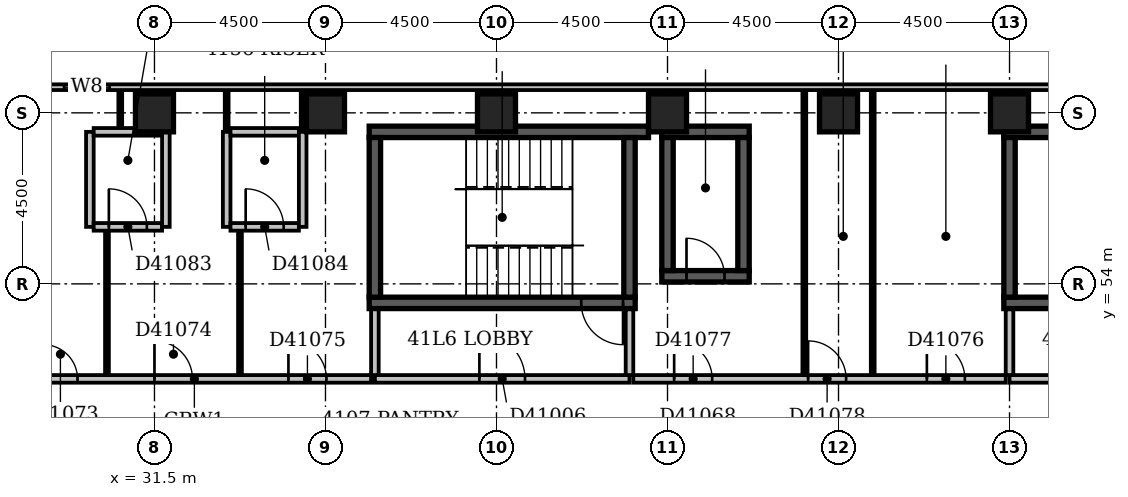
"""IFC4 building model, lengths in metres.
Left out: names, types, materials, properties, quantities, classifications, styles, units other than length and angle.
Written with IfcOpenShell. Run it as: python <this file> out.ifc"""

import sys

from ifc_helpers import new_model, si_unit, direction, frame, frame_2d, origin, origin_2d, place, context, subcontext, project, spatial, rectangle, extrude, element, fill, save


model = new_model("IFC4")
c1 = context("Model", 3, precision=1e-05, world=origin(), true_north=direction((0.0, 1.0)))
c2 = subcontext(c1, "Body", "Model", "MODEL_VIEW")
j1 = project(units=[si_unit("LENGTHUNIT", "METRE"), si_unit("PLANEANGLEUNIT", "RADIAN")], contexts=[c1])
p1 = place(None, origin())
s1 = spatial("IfcSite", under=j1, at=p1, CompositionType="ELEMENT")
p2 = place(p1, origin())
s2 = spatial("IfcBuilding", under=s1, at=p2, CompositionType="ELEMENT")
p3 = place(p2, frame((0.0, 0.0, 162.8)))
s3 = spatial("IfcBuildingStorey", under=s2, at=p3, CompositionType="ELEMENT", Elevation=162.8)
p4 = place(p3, frame((37.15, 53.5, -0.3), z_axis=(0.0, 0.0, 1.0), x_axis=(1.0, 0.0, 0.0)))
e1 = element("IfcWall", 1, at=p4, inside=s3, PredefinedType="SHEAR", context=c2, shape_type="SweptSolid", body=[
    extrude(rectangle(XDim=7.0, YDim=0.3, at=frame_2d((3.5, 0.0))), origin(), (0.0, 0.0, 1.0), 3.6),
])
p5 = place(p4, frame((5.58, 0.0, 0.3)))
e2 = element("IfcOpeningElement", 2, at=p5, cuts=e1, PredefinedType="OPENING", context=c2, shape_type="SweptSolid", body=[
    extrude(rectangle(XDim=1.1, YDim=2.1, at=frame_2d((0.55, 1.05))), frame((0.0, 0.162, 0.0), z_axis=(0.0, -1.0, 0.0), x_axis=(1.0, 0.0, 0.0)), (0.0, 0.0, 1.0), 0.324),
])
p6 = place(p3, frame((37.15, 58.0, -0.3), z_axis=(0.0, 0.0, 1.0), x_axis=(1.0, 0.0, 0.0)))
e3 = element("IfcWall", 3, at=p6, inside=s3, PredefinedType="SHEAR", context=c2, shape_type="SweptSolid", body=[
    extrude(rectangle(XDim=7.35, YDim=0.3, at=frame_2d((3.675, 0.0))), origin(), (0.0, 0.0, 1.0), 3.6),
])
for number, where, z_axis, x_axis in (
    (4, (37.3, 53.65, -0.3), (0.0, 0.0, 1.0), (0.0, 1.0, 0.0)),
    (5, (44.0, 53.65, -0.3), (0.0, 0.0, 1.0), (0.0, 1.0, 0.0)),
):
    element("IfcWall", number, at=place(p3, frame(where, z_axis=z_axis, x_axis=x_axis)), inside=s3, PredefinedType="SHEAR", context=c2, shape_type="SweptSolid", body=[
        extrude(rectangle(XDim=4.2, YDim=0.3, at=frame_2d((2.1, 0.0))), origin(), (0.0, 0.0, 1.0), 3.6),
    ])
p7 = place(p3, frame((44.85, 54.2, -0.3), z_axis=(0.0, 0.0, 1.0), x_axis=(1.0, 0.0, 0.0)))
e6 = element("IfcWall", 6, at=p7, inside=s3, PredefinedType="SHEAR", context=c2, shape_type="SweptSolid", body=[
    extrude(rectangle(XDim=2.3, YDim=0.3, at=frame_2d((1.15, 0.0))), origin(), (0.0, 0.0, 1.0), 3.6),
])
p8 = place(p7, frame((0.65, 0.0, 0.3)))
e7 = element("IfcOpeningElement", 7, at=p8, cuts=e6, PredefinedType="OPENING", context=c2, shape_type="SweptSolid", body=[
    extrude(rectangle(XDim=1.0, YDim=2.1, at=frame_2d((0.5, 1.05))), frame((0.0, 0.162, 0.0), z_axis=(0.0, -1.0, 0.0), x_axis=(1.0, 0.0, 0.0)), (0.0, 0.0, 1.0), 0.324),
])
p9 = place(p3, frame((44.85, 58.0, -0.3), z_axis=(0.0, 0.0, 1.0), x_axis=(1.0, 0.0, 0.0)))
e8 = element("IfcWall", 8, at=p9, inside=s3, PredefinedType="SHEAR", context=c2, shape_type="SweptSolid", body=[
    extrude(rectangle(XDim=2.3, YDim=0.3, at=frame_2d((1.15, 0.0))), origin(), (0.0, 0.0, 1.0), 3.6),
])
for number, where, z_axis, x_axis in (
    (9, (45.0, 54.35, -0.3), (0.0, 0.0, 1.0), (0.0, 1.0, 0.0)),
    (10, (47.0, 54.35, -0.3), (0.0, 0.0, 1.0), (0.0, 1.0, 0.0)),
):
    element("IfcWall", number, at=place(p3, frame(where, z_axis=z_axis, x_axis=x_axis)), inside=s3, PredefinedType="SHEAR", context=c2, shape_type="SweptSolid", body=[
        extrude(rectangle(XDim=3.5, YDim=0.3, at=frame_2d((1.75, 0.0))), origin(), (0.0, 0.0, 1.0), 3.6),
    ])
p10 = place(p3, frame((53.85, 53.5, -0.3), z_axis=(0.0, 0.0, 1.0), x_axis=(1.0, 0.0, 0.0)))
e11 = element("IfcWall", 11, at=p10, inside=s3, PredefinedType="SHEAR", context=c2, shape_type="SweptSolid", body=[
    extrude(rectangle(XDim=7.0, YDim=0.3, at=frame_2d((3.5, 0.0))), origin(), (0.0, 0.0, 1.0), 3.6),
])
p11 = place(p10, frame((5.58, 0.0, 0.3)))
e12 = element("IfcOpeningElement", 12, at=p11, cuts=e11, PredefinedType="OPENING", context=c2, shape_type="SweptSolid", body=[
    extrude(rectangle(XDim=1.1, YDim=2.1, at=frame_2d((0.55, 1.05))), frame((0.0, 0.162, 0.0), z_axis=(0.0, -1.0, 0.0), x_axis=(1.0, 0.0, 0.0)), (0.0, 0.0, 1.0), 0.324),
])
p12 = place(p3, frame((53.85, 58.0, -0.3), z_axis=(0.0, 0.0, 1.0), x_axis=(1.0, 0.0, 0.0)))
e13 = element("IfcWall", 13, at=p12, inside=s3, PredefinedType="SHEAR", context=c2, shape_type="SweptSolid", body=[
    extrude(rectangle(XDim=7.0, YDim=0.3, at=frame_2d((3.5, 0.0))), origin(), (0.0, 0.0, 1.0), 3.6),
])
p13 = place(p3, frame((54.0, 53.65, -0.3), z_axis=(0.0, 0.0, 1.0), x_axis=(0.0, 1.0, 0.0)))
e14 = element("IfcWall", 14, at=p13, inside=s3, PredefinedType="SHEAR", context=c2, shape_type="SweptSolid", body=[
    extrude(rectangle(XDim=4.2, YDim=0.3, at=frame_2d((2.1, 0.0))), origin(), (0.0, 0.0, 1.0), 3.6),
])
for number, where, z_axis, x_axis in (
    (15, (31.5, 58.5, -0.3), (0.0, 0.0, 1.0), (1.0, 0.0, 0.0)),
    (16, (36.0, 58.5, -0.3), (0.0, 0.0, 1.0), (1.0, 0.0, 0.0)),
    (17, (40.5, 58.5, -0.3), (0.0, 0.0, 1.0), (1.0, 0.0, 0.0)),
    (18, (45.0, 58.5, -0.3), (0.0, 0.0, 1.0), (1.0, 0.0, 0.0)),
    (19, (49.5, 58.5, -0.3), (0.0, 0.0, 1.0), (1.0, 0.0, 0.0)),
    (20, (54.0, 58.5, -0.3), (0.0, 0.0, 1.0), (1.0, 0.0, 0.0)),
):
    element("IfcColumn", number, at=place(p3, frame(where, z_axis=z_axis, x_axis=x_axis)), inside=s3, PredefinedType="COLUMN", context=c2, shape_type="SweptSolid", body=[
        extrude(rectangle(XDim=1.0, YDim=1.0, at=origin_2d()), origin(), (0.0, 0.0, 1.0), 3.6),
    ])
p14 = place(p3, frame((68.1, 59.175, 0.0), z_axis=(0.0, 0.0, 1.0), x_axis=(-1.0, 0.0, 0.0)))
e21 = element("IfcWall", 21, at=p14, inside=s3, PredefinedType="STANDARD", context=c2, shape_type="SweptSolid", body=[
    extrude(rectangle(XDim=68.85, YDim=0.15, at=frame_2d((34.425, 0.0))), origin(), (0.0, 0.0, 1.0), 2.7),
])
p15 = place(p14, frame((1.65, 0.0, 0.6)))
e22 = element("IfcOpeningElement", 22, at=p15, cuts=e21, PredefinedType="OPENING", context=c2, shape_type="SweptSolid", body=[
    extrude(rectangle(XDim=2.4, YDim=1.8, at=frame_2d((1.2, 0.9))), frame((0.0, 0.087, 0.0), z_axis=(0.0, -1.0, 0.0), x_axis=(1.0, 0.0, 0.0)), (0.0, 0.0, 1.0), 0.174),
])
p16 = place(p14, frame((6.15, 0.0, 0.6)))
e23 = element("IfcOpeningElement", 23, at=p16, cuts=e21, PredefinedType="OPENING", context=c2, shape_type="SweptSolid", body=[
    extrude(rectangle(XDim=2.4, YDim=1.8, at=frame_2d((1.2, 0.9))), frame((0.0, 0.087, 0.0), z_axis=(0.0, -1.0, 0.0), x_axis=(1.0, 0.0, 0.0)), (0.0, 0.0, 1.0), 0.174),
])
p17 = place(p14, frame((37.78, 0.0, 0.6)))
e24 = element("IfcOpeningElement", 24, at=p17, cuts=e21, PredefinedType="OPENING", context=c2, shape_type="SweptSolid", body=[
    extrude(rectangle(XDim=1.2, YDim=1.8, at=frame_2d((0.6, 0.9))), frame((0.0, 0.087, 0.0), z_axis=(0.0, -1.0, 0.0), x_axis=(1.0, 0.0, 0.0)), (0.0, 0.0, 1.0), 0.174),
])
p18 = place(p3, frame((37.3, 51.5, 0.0), z_axis=(0.0, 0.0, 1.0), x_axis=(1.0, 0.0, 0.0)))
e25 = element("IfcWall", 25, at=p18, inside=s3, PredefinedType="PARTITIONING", context=c2, shape_type="SweptSolid", body=[
    extrude(rectangle(XDim=6.7, YDim=0.2, at=frame_2d((3.35, 0.0))), origin(), (0.0, 0.0, 1.0), 3.3),
])
p19 = place(p18, frame((2.75, 0.0, 0.0)))
e26 = element("IfcOpeningElement", 26, at=p19, cuts=e25, PredefinedType="OPENING", context=c2, shape_type="SweptSolid", body=[
    extrude(rectangle(XDim=1.2, YDim=2.1, at=frame_2d((0.6, 1.05))), frame((0.0, 0.112, 0.0), z_axis=(0.0, -1.0, 0.0), x_axis=(1.0, 0.0, 0.0)), (0.0, 0.0, 1.0), 0.224),
])
for number, where, z_axis, x_axis in (
    (27, (44.0, 51.6, 0.0), (0.0, 0.0, 1.0), (0.0, 1.0, 0.0)),
    (28, (37.3, 51.6, 0.0), (0.0, 0.0, 1.0), (0.0, 1.0, 0.0)),
):
    element("IfcWall", number, at=place(p3, frame(where, z_axis=z_axis, x_axis=x_axis)), inside=s3, PredefinedType="PARTITIONING", context=c2, shape_type="SweptSolid", body=[
        extrude(rectangle(XDim=1.73, YDim=0.2, at=frame_2d((0.865, 0.0))), origin(), (0.0, 0.0, 1.0), 3.3),
    ])
p20 = place(p3, frame((54.0, 51.5, 0.0), z_axis=(0.0, 0.0, 1.0), x_axis=(1.0, 0.0, 0.0)))
e29 = element("IfcWall", 29, at=p20, inside=s3, PredefinedType="PARTITIONING", context=c2, shape_type="SweptSolid", body=[
    extrude(rectangle(XDim=6.7, YDim=0.2, at=frame_2d((3.35, 0.0))), origin(), (0.0, 0.0, 1.0), 3.3),
])
p21 = place(p20, frame((2.75, 0.0, 0.0)))
e30 = element("IfcOpeningElement", 30, at=p21, cuts=e29, PredefinedType="OPENING", context=c2, shape_type="SweptSolid", body=[
    extrude(rectangle(XDim=1.2, YDim=2.1, at=frame_2d((0.6, 1.05))), frame((0.0, 0.112, 0.0), z_axis=(0.0, -1.0, 0.0), x_axis=(1.0, 0.0, 0.0)), (0.0, 0.0, 1.0), 0.224),
])
p22 = place(p3, frame((54.0, 51.6, 0.0), z_axis=(0.0, 0.0, 1.0), x_axis=(0.0, 1.0, 0.0)))
e31 = element("IfcWall", 31, at=p22, inside=s3, PredefinedType="PARTITIONING", context=c2, shape_type="SweptSolid", body=[
    extrude(rectangle(XDim=1.73, YDim=0.2, at=frame_2d((0.865, 0.0))), origin(), (0.0, 0.0, 1.0), 2.6),
])
p23 = place(p3, frame((27.9, 51.5, 0.0), z_axis=(0.0, 0.0, 1.0), x_axis=(1.0, 0.0, 0.0)))
e32 = element("IfcWall", 32, at=p23, inside=s3, PredefinedType="PARTITIONING", context=c2, shape_type="SweptSolid", body=[
    extrude(rectangle(XDim=9.3, YDim=0.2, at=frame_2d((4.65, 0.0))), origin(), (0.0, 0.0, 1.0), 3.3),
])
p24 = place(p23, frame((0.675, 0.0, 0.0)))
e33 = element("IfcOpeningElement", 33, at=p24, cuts=e32, PredefinedType="OPENING", context=c2, shape_type="SweptSolid", body=[
    extrude(rectangle(XDim=0.9, YDim=2.1, at=frame_2d((0.45, 1.05))), frame((0.0, 0.112, 0.0), z_axis=(0.0, -1.0, 0.0), x_axis=(1.0, 0.0, 0.0)), (0.0, 0.0, 1.0), 0.224),
])
p25 = place(p23, frame((3.6, 0.0, 0.0)))
e34 = element("IfcOpeningElement", 34, at=p25, cuts=e32, PredefinedType="OPENING", context=c2, shape_type="SweptSolid", body=[
    extrude(rectangle(XDim=1.0, YDim=2.1, at=frame_2d((0.5, 1.05))), frame((0.0, 0.112, 0.0), z_axis=(0.0, -1.0, 0.0), x_axis=(1.0, 0.0, 0.0)), (0.0, 0.0, 1.0), 0.224),
])
p26 = place(p23, frame((7.125, 0.0, 0.0)))
e35 = element("IfcOpeningElement", 35, at=p26, cuts=e32, PredefinedType="OPENING", context=c2, shape_type="SweptSolid", body=[
    extrude(rectangle(XDim=1.0, YDim=2.1, at=frame_2d((0.5, 1.05))), frame((0.0, 0.112, 0.0), z_axis=(0.0, -1.0, 0.0), x_axis=(1.0, 0.0, 0.0)), (0.0, 0.0, 1.0), 0.224),
])
p27 = place(p3, frame((44.1, 51.5, 0.0), z_axis=(0.0, 0.0, 1.0), x_axis=(1.0, 0.0, 0.0)))
e36 = element("IfcWall", 36, at=p27, inside=s3, PredefinedType="PARTITIONING", context=c2, shape_type="SweptSolid", body=[
    extrude(rectangle(XDim=9.8, YDim=0.2, at=frame_2d((4.9, 0.0))), origin(), (0.0, 0.0, 1.0), 3.3),
])
p28 = place(p27, frame((7.725, 0.0, 0.0)))
e37 = element("IfcOpeningElement", 37, at=p28, cuts=e36, PredefinedType="OPENING", context=c2, shape_type="SweptSolid", body=[
    extrude(rectangle(XDim=1.0, YDim=2.1, at=frame_2d((0.5, 1.05))), frame((0.0, 0.112, 0.0), z_axis=(0.0, -1.0, 0.0), x_axis=(1.0, 0.0, 0.0)), (0.0, 0.0, 1.0), 0.224),
])
p29 = place(p27, frame((1.075, 0.0, 0.0)))
e38 = element("IfcOpeningElement", 38, at=p29, cuts=e36, PredefinedType="OPENING", context=c2, shape_type="SweptSolid", body=[
    extrude(rectangle(XDim=1.0, YDim=2.1, at=frame_2d((0.5, 1.05))), frame((0.0, 0.112, 0.0), z_axis=(0.0, -1.0, 0.0), x_axis=(1.0, 0.0, 0.0)), (0.0, 0.0, 1.0), 0.224),
])
p30 = place(p27, frame((4.6, 0.0, 0.0)))
e39 = element("IfcOpeningElement", 39, at=p30, cuts=e36, PredefinedType="OPENING", context=c2, shape_type="SweptSolid", body=[
    extrude(rectangle(XDim=1.0, YDim=2.1, at=frame_2d((0.5, 1.05))), frame((0.0, 0.112, 0.0), z_axis=(0.0, -1.0, 0.0), x_axis=(1.0, 0.0, 0.0)), (0.0, 0.0, 1.0), 0.224),
])
for number, where, z_axis, x_axis in (
    (40, (30.25, 51.6, 0.0), (0.0, 0.0, 1.0), (0.0, 1.0, 0.0)),
    (41, (33.75, 51.6, 0.0), (0.0, 0.0, 1.0), (0.0, 1.0, 0.0)),
):
    element("IfcWall", number, at=place(p3, frame(where, z_axis=z_axis, x_axis=x_axis)), inside=s3, PredefinedType="PARTITIONING", context=c2, shape_type="SweptSolid", body=[
        extrude(rectangle(XDim=3.8, YDim=0.1, at=frame_2d((1.9, 0.0))), origin(), (0.0, 0.0, 1.0), 3.3),
    ])
for number, where, z_axis, x_axis in (
    (42, (48.6, 51.6, 0.0), (0.0, 0.0, 1.0), (0.0, 1.0, 0.0)),
    (43, (50.4, 51.6, 0.0), (0.0, 0.0, 1.0), (0.0, 1.0, 0.0)),
):
    element("IfcWall", number, at=place(p3, frame(where, z_axis=z_axis, x_axis=x_axis)), inside=s3, PredefinedType="PARTITIONING", context=c2, shape_type="SweptSolid", body=[
        extrude(rectangle(XDim=7.5, YDim=0.1, at=frame_2d((3.75, 0.0))), origin(), (0.0, 0.0, 1.0), 3.3),
    ])
p31 = place(p3, frame((29.8, 55.5, 0.0), z_axis=(0.0, 0.0, 1.0), x_axis=(0.0, 1.0, 0.0)))
e44 = element("IfcWall", 44, at=p31, inside=s3, PredefinedType="PARTITIONING", context=c2, shape_type="SweptSolid", body=[
    extrude(rectangle(XDim=2.5, YDim=0.2, at=frame_2d((1.25, 0.0))), origin(), (0.0, 0.0, 1.0), 3.3),
])
p32 = place(p3, frame((29.9, 55.5, 0.0), z_axis=(0.0, 0.0, 1.0), x_axis=(1.0, 0.0, 0.0)))
e45 = element("IfcWall", 45, at=p32, inside=s3, PredefinedType="PARTITIONING", context=c2, shape_type="SweptSolid", body=[
    extrude(rectangle(XDim=1.8, YDim=0.2, at=frame_2d((0.9, 0.0))), origin(), (0.0, 0.0, 1.0), 3.3),
])
p33 = place(p32, frame((0.4, 0.0, 0.0)))
e46 = element("IfcOpeningElement", 46, at=p33, cuts=e45, PredefinedType="OPENING", context=c2, shape_type="SweptSolid", body=[
    extrude(rectangle(XDim=1.0, YDim=2.1, at=frame_2d((0.5, 1.05))), frame((0.0, 0.112, 0.0), z_axis=(0.0, -1.0, 0.0), x_axis=(1.0, 0.0, 0.0)), (0.0, 0.0, 1.0), 0.224),
])
for number, where, z_axis, x_axis in (
    (47, (31.8, 55.5, 0.0), (0.0, 0.0, 1.0), (0.0, 1.0, 0.0)),
    (48, (33.4, 55.5, 0.0), (0.0, 0.0, 1.0), (0.0, 1.0, 0.0)),
):
    element("IfcWall", number, at=place(p3, frame(where, z_axis=z_axis, x_axis=x_axis)), inside=s3, PredefinedType="PARTITIONING", context=c2, shape_type="SweptSolid", body=[
        extrude(rectangle(XDim=2.5, YDim=0.2, at=frame_2d((1.25, 0.0))), origin(), (0.0, 0.0, 1.0), 3.3),
    ])
p34 = place(p3, frame((33.5, 55.5, 0.0), z_axis=(0.0, 0.0, 1.0), x_axis=(1.0, 0.0, 0.0)))
e49 = element("IfcWall", 49, at=p34, inside=s3, PredefinedType="PARTITIONING", context=c2, shape_type="SweptSolid", body=[
    extrude(rectangle(XDim=1.8, YDim=0.2, at=frame_2d((0.9, 0.0))), origin(), (0.0, 0.0, 1.0), 3.3),
])
p35 = place(p34, frame((0.4, 0.0, 0.0)))
e50 = element("IfcOpeningElement", 50, at=p35, cuts=e49, PredefinedType="OPENING", context=c2, shape_type="SweptSolid", body=[
    extrude(rectangle(XDim=1.0, YDim=2.1, at=frame_2d((0.5, 1.05))), frame((0.0, 0.112, 0.0), z_axis=(0.0, -1.0, 0.0), x_axis=(1.0, 0.0, 0.0)), (0.0, 0.0, 1.0), 0.224),
])
p36 = place(p3, frame((35.4, 55.5, 0.0), z_axis=(0.0, 0.0, 1.0), x_axis=(0.0, 1.0, 0.0)))
e51 = element("IfcWall", 51, at=p36, inside=s3, PredefinedType="PARTITIONING", context=c2, shape_type="SweptSolid", body=[
    extrude(rectangle(XDim=2.5, YDim=0.2, at=frame_2d((1.25, 0.0))), origin(), (0.0, 0.0, 1.0), 2.4),
])
p37 = place(p3, frame((29.9, 58.0, 0.0), z_axis=(0.0, 0.0, 1.0), x_axis=(1.0, 0.0, 0.0)))
e52 = element("IfcWall", 52, at=p37, inside=s3, PredefinedType="PARTITIONING", context=c2, shape_type="SweptSolid", body=[
    extrude(rectangle(XDim=1.8, YDim=0.2, at=frame_2d((0.9, 0.0))), origin(), (0.0, 0.0, 1.0), 3.3),
])
p38 = place(p3, frame((33.4, 58.0, 0.0), z_axis=(0.0, 0.0, 1.0), x_axis=(0.0, 1.0, 0.0)))
e53 = element("IfcWall", 53, at=p38, inside=s3, PredefinedType="PARTITIONING", context=c2, shape_type="SweptSolid", body=[
    extrude(rectangle(XDim=1.1, YDim=0.1, at=frame_2d((0.55, 0.0))), origin(), (0.0, 0.0, 1.0), 3.3),
])
p39 = place(p3, frame((33.5, 58.0, 0.0), z_axis=(0.0, 0.0, 1.0), x_axis=(1.0, 0.0, 0.0)))
e54 = element("IfcWall", 54, at=p39, inside=s3, PredefinedType="PARTITIONING", context=c2, shape_type="SweptSolid", body=[
    extrude(rectangle(XDim=1.8, YDim=0.2, at=frame_2d((0.9, 0.0))), origin(), (0.0, 0.0, 1.0), 3.3),
])
p40 = place(p3, frame((35.4, 58.0, 0.0), z_axis=(0.0, 0.0, 1.0), x_axis=(0.0, 1.0, 0.0)))
e55 = element("IfcWall", 55, at=p40, inside=s3, PredefinedType="PARTITIONING", context=c2, shape_type="SweptSolid", body=[
    extrude(rectangle(XDim=1.1, YDim=0.1, at=frame_2d((0.55, 0.0))), origin(), (0.0, 0.0, 1.0), 2.4),
])
p41 = place(p3, frame((30.6, 58.1, 0.0), z_axis=(0.0, 0.0, 1.0), x_axis=(0.0, 1.0, 0.0)))
e56 = element("IfcWall", 56, at=p41, inside=s3, PredefinedType="PARTITIONING", context=c2, shape_type="SweptSolid", body=[
    extrude(rectangle(XDim=1.0, YDim=0.1, at=frame_2d((0.5, 0.0))), origin(), (0.0, 0.0, 1.0), 3.3),
])
p42 = place(p17, origin())
e57 = element("IfcWindow", 57, at=p42, inside=s3, PartitioningType="SINGLE_PANEL", PredefinedType="WINDOW", context=c2, shape_type="SweptSolid", body=[
    extrude(rectangle(XDim=1.2, YDim=1.8, at=frame_2d((0.6, 0.9))), frame((0.0, 0.03, 0.0), z_axis=(0.0, -1.0, 0.0), x_axis=(1.0, 0.0, 0.0)), (0.0, 0.0, 1.0), 0.06),
])
fill(e24, e57)
p43 = place(p19, origin())
e58 = element("IfcDoor", 58, at=p43, inside=s3, OperationType="SINGLE_SWING_LEFT", PredefinedType="DOOR", context=c2, shape_type="SweptSolid", body=[
    extrude(rectangle(XDim=1.2, YDim=2.1, at=frame_2d((0.6, 1.05))), frame((0.0, 0.025, 0.0), z_axis=(0.0, -1.0, 0.0), x_axis=(1.0, 0.0, 0.0)), (0.0, 0.0, 1.0), 0.05),
])
fill(e26, e58)
p44 = place(p8, origin())
e59 = element("IfcDoor", 59, at=p44, inside=s3, OperationType="SINGLE_SWING_LEFT", PredefinedType="DOOR", context=c2, shape_type="SweptSolid", body=[
    extrude(rectangle(XDim=1.0, YDim=2.1, at=frame_2d((0.5, 1.05))), frame((0.0, 0.025, 0.0), z_axis=(0.0, -1.0, 0.0), x_axis=(1.0, 0.0, 0.0)), (0.0, 0.0, 1.0), 0.05),
])
fill(e7, e59)
p45 = place(p5, origin())
e60 = element("IfcDoor", 60, at=p45, inside=s3, OperationType="SINGLE_SWING_RIGHT", PredefinedType="DOOR", context=c2, shape_type="SweptSolid", body=[
    extrude(rectangle(XDim=1.1, YDim=2.1, at=frame_2d((0.55, 1.05))), frame((0.0, 0.025, 0.0), z_axis=(0.0, -1.0, 0.0), x_axis=(1.0, 0.0, 0.0)), (0.0, 0.0, 1.0), 0.05),
])
fill(e2, e60)
p46 = place(p24, origin())
e61 = element("IfcDoor", 61, at=p46, inside=s3, OperationType="SINGLE_SWING_LEFT", PredefinedType="DOOR", context=c2, shape_type="SweptSolid", body=[
    extrude(rectangle(XDim=0.9, YDim=2.1, at=frame_2d((0.45, 1.05))), frame((0.0, 0.025, 0.0), z_axis=(0.0, -1.0, 0.0), x_axis=(1.0, 0.0, 0.0)), (0.0, 0.0, 1.0), 0.05),
])
fill(e33, e61)
p47 = place(p25, origin())
e62 = element("IfcDoor", 62, at=p47, inside=s3, OperationType="SINGLE_SWING_LEFT", PredefinedType="DOOR", context=c2, shape_type="SweptSolid", body=[
    extrude(rectangle(XDim=1.0, YDim=2.1, at=frame_2d((0.5, 1.05))), frame((0.0, 0.025, 0.0), z_axis=(0.0, -1.0, 0.0), x_axis=(1.0, 0.0, 0.0)), (0.0, 0.0, 1.0), 0.05),
])
fill(e34, e62)
p48 = place(p26, origin())
e63 = element("IfcDoor", 63, at=p48, inside=s3, OperationType="SINGLE_SWING_LEFT", PredefinedType="DOOR", context=c2, shape_type="SweptSolid", body=[
    extrude(rectangle(XDim=1.0, YDim=2.1, at=frame_2d((0.5, 1.05))), frame((0.0, 0.025, 0.0), z_axis=(0.0, -1.0, 0.0), x_axis=(1.0, 0.0, 0.0)), (0.0, 0.0, 1.0), 0.05),
])
fill(e35, e63)
p49 = place(p28, origin())
e64 = element("IfcDoor", 64, at=p49, inside=s3, OperationType="SINGLE_SWING_LEFT", PredefinedType="DOOR", context=c2, shape_type="SweptSolid", body=[
    extrude(rectangle(XDim=1.0, YDim=2.1, at=frame_2d((0.5, 1.05))), frame((0.0, 0.025, 0.0), z_axis=(0.0, -1.0, 0.0), x_axis=(1.0, 0.0, 0.0)), (0.0, 0.0, 1.0), 0.05),
])
fill(e37, e64)
p50 = place(p29, origin())
e65 = element("IfcDoor", 65, at=p50, inside=s3, OperationType="SINGLE_SWING_LEFT", PredefinedType="DOOR", context=c2, shape_type="SweptSolid", body=[
    extrude(rectangle(XDim=1.0, YDim=2.1, at=frame_2d((0.5, 1.05))), frame((0.0, 0.025, 0.0), z_axis=(0.0, -1.0, 0.0), x_axis=(1.0, 0.0, 0.0)), (0.0, 0.0, 1.0), 0.05),
])
fill(e38, e65)
p51 = place(p30, origin())
e66 = element("IfcDoor", 66, at=p51, inside=s3, OperationType="SINGLE_SWING_LEFT", PredefinedType="DOOR", context=c2, shape_type="SweptSolid", body=[
    extrude(rectangle(XDim=1.0, YDim=2.1, at=frame_2d((0.5, 1.05))), frame((0.0, 0.025, 0.0), z_axis=(0.0, -1.0, 0.0), x_axis=(1.0, 0.0, 0.0)), (0.0, 0.0, 1.0), 0.05),
])
fill(e39, e66)
p52 = place(p33, origin())
e67 = element("IfcDoor", 67, at=p52, inside=s3, OperationType="SINGLE_SWING_LEFT", PredefinedType="DOOR", context=c2, shape_type="SweptSolid", body=[
    extrude(rectangle(XDim=1.0, YDim=2.1, at=frame_2d((0.5, 1.05))), frame((0.0, 0.025, 0.0), z_axis=(0.0, -1.0, 0.0), x_axis=(1.0, 0.0, 0.0)), (0.0, 0.0, 1.0), 0.05),
])
fill(e46, e67)
p53 = place(p35, origin())
e68 = element("IfcDoor", 68, at=p53, inside=s3, OperationType="SINGLE_SWING_LEFT", PredefinedType="DOOR", context=c2, shape_type="SweptSolid", body=[
    extrude(rectangle(XDim=1.0, YDim=2.1, at=frame_2d((0.5, 1.05))), frame((0.0, 0.025, 0.0), z_axis=(0.0, -1.0, 0.0), x_axis=(1.0, 0.0, 0.0)), (0.0, 0.0, 1.0), 0.05),
])
fill(e50, e68)
save(model, sys.argv[1])
